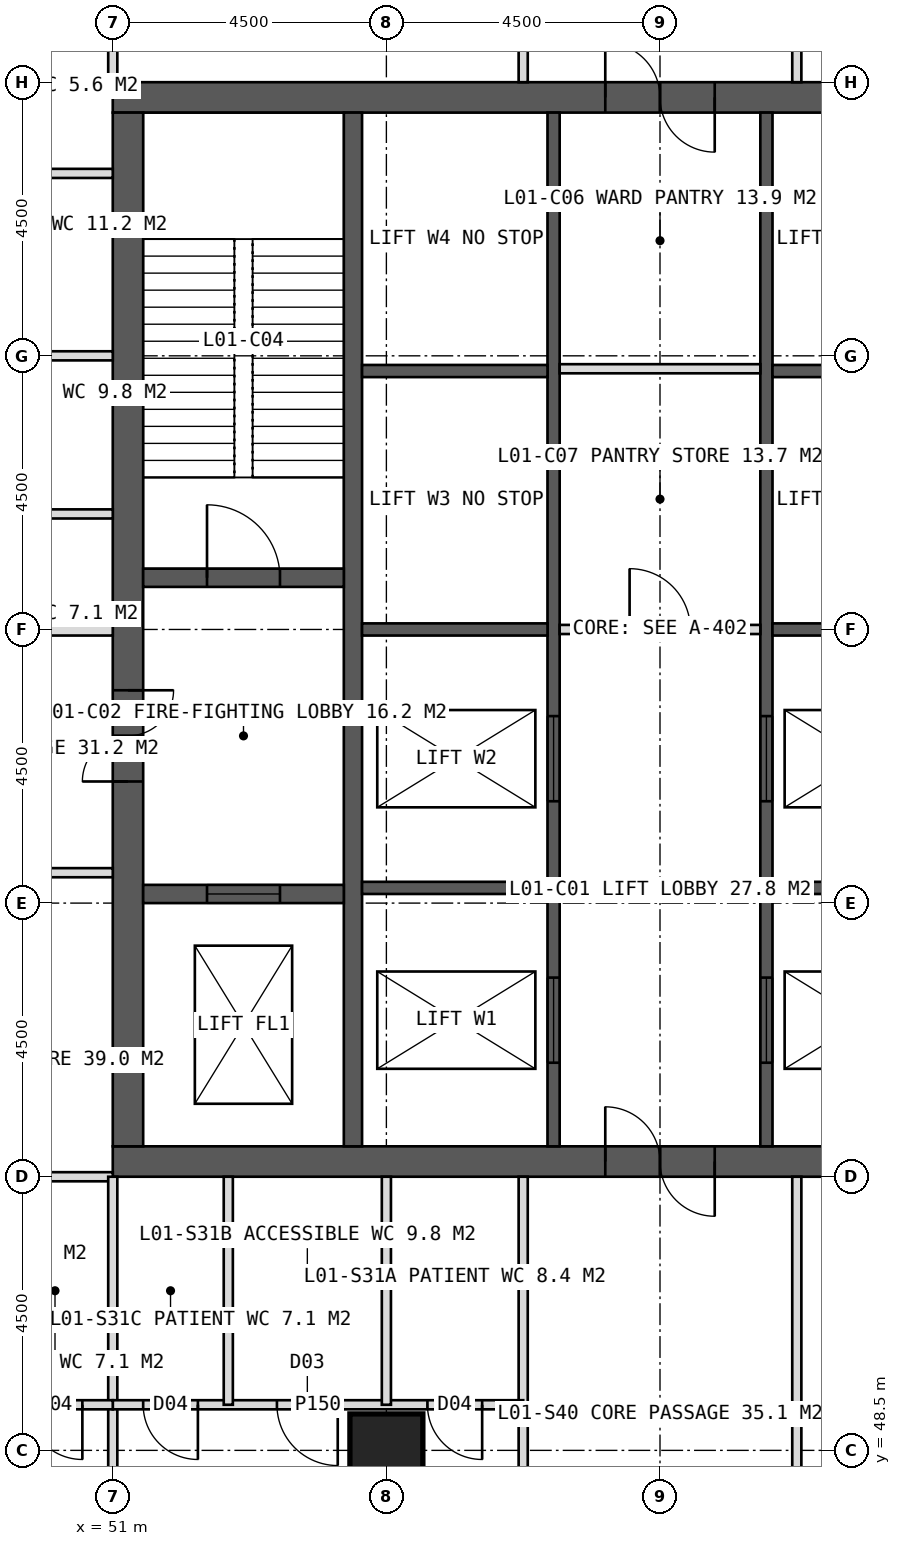
"""IFC4 building model, lengths in metres.
Left out: names, types, materials, properties, quantities, classifications, styles, units other than length and angle.
Written with IfcOpenShell. Run it as: python <this file> out.ifc"""

import sys

from ifc_helpers import new_model, si_unit, direction, frame, frame_2d, origin, origin_2d, place, context, subcontext, project, spatial, rectangle, hollow_rectangle, extrude, element, fill, save


model = new_model("IFC4")
c1 = context("Model", 3, precision=1e-05, world=origin(), true_north=direction((0.0, 1.0)))
c2 = subcontext(c1, "Body", "Model", "MODEL_VIEW")
j1 = project(units=[si_unit("LENGTHUNIT", "METRE"), si_unit("PLANEANGLEUNIT", "RADIAN")], contexts=[c1])
p1 = place(None, origin())
s1 = spatial("IfcSite", under=j1, at=p1, CompositionType="ELEMENT")
p2 = place(p1, origin())
s2 = spatial("IfcBuilding", under=s1, at=p2, CompositionType="ELEMENT")
p3 = place(p2, frame((0.0, 0.0, 6.0)))
s3 = spatial("IfcBuildingStorey", under=s2, at=p3, CompositionType="ELEMENT", Elevation=6.0)
p4 = place(p3, frame((51.0, 70.75, 0.0), z_axis=(0.0, 0.0, 1.0), x_axis=(1.0, 0.0, 0.0)))
e1 = element("IfcWall", 1, at=p4, inside=s3, PredefinedType="SHEAR", context=c2, shape_type="SweptSolid", body=[
    extrude(rectangle(XDim=18.0, YDim=0.5, at=frame_2d((9.0, 0.0))), origin(), (0.0, 0.0, 1.0), 5.0),
])
p5 = place(p4, frame((8.1, 0.0, 0.0)))
e2 = element("IfcOpeningElement", 2, at=p5, cuts=e1, PredefinedType="OPENING", context=c2, shape_type="SweptSolid", body=[
    extrude(rectangle(XDim=1.8, YDim=2.2, at=frame_2d((0.9, 1.1))), frame((0.0, 0.26, 0.0), z_axis=(0.0, -1.0, 0.0), x_axis=(1.0, 0.0, 0.0)), (0.0, 0.0, 1.0), 0.52),
])
p6 = place(p3, frame((51.0, 53.25, 0.0), z_axis=(0.0, 0.0, 1.0), x_axis=(1.0, 0.0, 0.0)))
e3 = element("IfcWall", 3, at=p6, inside=s3, PredefinedType="SHEAR", context=c2, shape_type="SweptSolid", body=[
    extrude(rectangle(XDim=18.0, YDim=0.5, at=frame_2d((9.0, 0.0))), origin(), (0.0, 0.0, 1.0), 5.0),
])
p7 = place(p6, frame((8.1, 0.0, 0.0)))
e4 = element("IfcOpeningElement", 4, at=p7, cuts=e3, PredefinedType="OPENING", context=c2, shape_type="SweptSolid", body=[
    extrude(rectangle(XDim=1.8, YDim=2.2, at=frame_2d((0.9, 1.1))), frame((0.0, 0.26, 0.0), z_axis=(0.0, -1.0, 0.0), x_axis=(1.0, 0.0, 0.0)), (0.0, 0.0, 1.0), 0.52),
])
p8 = place(p3, frame((51.25, 53.5, 0.0), z_axis=(0.0, 0.0, 1.0), x_axis=(0.0, 1.0, 0.0)))
e5 = element("IfcWall", 5, at=p8, inside=s3, PredefinedType="SHEAR", context=c2, shape_type="SweptSolid", body=[
    extrude(rectangle(XDim=17.0, YDim=0.5, at=frame_2d((8.5, 0.0))), origin(), (0.0, 0.0, 1.0), 5.0),
])
p9 = place(p8, frame((6.0, 0.0, 0.0)))
e6 = element("IfcOpeningElement", 6, at=p9, cuts=e5, PredefinedType="OPENING", context=c2, shape_type="SweptSolid", body=[
    extrude(rectangle(XDim=1.5, YDim=2.2, at=frame_2d((0.75, 1.1))), frame((0.0, 0.26, 0.0), z_axis=(0.0, -1.0, 0.0), x_axis=(1.0, 0.0, 0.0)), (0.0, 0.0, 1.0), 0.52),
])
p10 = place(p3, frame((54.95, 53.5, 0.0), z_axis=(0.0, 0.0, 1.0), x_axis=(0.0, 1.0, 0.0)))
e7 = element("IfcWall", 7, at=p10, inside=s3, PredefinedType="SHEAR", context=c2, shape_type="SweptSolid", body=[
    extrude(rectangle(XDim=17.0, YDim=0.3, at=frame_2d((8.5, 0.0))), origin(), (0.0, 0.0, 1.0), 5.0),
])
p11 = place(p3, frame((58.25, 53.5, 0.0), z_axis=(0.0, 0.0, 1.0), x_axis=(0.0, 1.0, 0.0)))
e8 = element("IfcWall", 8, at=p11, inside=s3, PredefinedType="SHEAR", context=c2, shape_type="SweptSolid", body=[
    extrude(rectangle(XDim=17.0, YDim=0.2, at=frame_2d((8.5, 0.0))), origin(), (0.0, 0.0, 1.0), 5.0),
])
p12 = place(p11, frame((1.375, 0.0, 0.0)))
e9 = element("IfcOpeningElement", 9, at=p12, cuts=e8, PredefinedType="OPENING", context=c2, shape_type="SweptSolid", body=[
    extrude(rectangle(XDim=1.4, YDim=2.2, at=frame_2d((0.7, 1.1))), frame((0.0, 0.11, 0.0), z_axis=(0.0, -1.0, 0.0), x_axis=(1.0, 0.0, 0.0)), (0.0, 0.0, 1.0), 0.22),
])
p13 = place(p11, frame((5.675, 0.0, 0.0)))
e10 = element("IfcOpeningElement", 10, at=p13, cuts=e8, PredefinedType="OPENING", context=c2, shape_type="SweptSolid", body=[
    extrude(rectangle(XDim=1.4, YDim=2.2, at=frame_2d((0.7, 1.1))), frame((0.0, 0.11, 0.0), z_axis=(0.0, -1.0, 0.0), x_axis=(1.0, 0.0, 0.0)), (0.0, 0.0, 1.0), 0.22),
])
p14 = place(p3, frame((61.75, 53.5, 0.0), z_axis=(0.0, 0.0, 1.0), x_axis=(0.0, 1.0, 0.0)))
e11 = element("IfcWall", 11, at=p14, inside=s3, PredefinedType="SHEAR", context=c2, shape_type="SweptSolid", body=[
    extrude(rectangle(XDim=17.0, YDim=0.2, at=frame_2d((8.5, 0.0))), origin(), (0.0, 0.0, 1.0), 5.0),
])
p15 = place(p14, frame((1.375, 0.0, 0.0)))
e12 = element("IfcOpeningElement", 12, at=p15, cuts=e11, PredefinedType="OPENING", context=c2, shape_type="SweptSolid", body=[
    extrude(rectangle(XDim=1.4, YDim=2.2, at=frame_2d((0.7, 1.1))), frame((0.0, 0.11, 0.0), z_axis=(0.0, -1.0, 0.0), x_axis=(1.0, 0.0, 0.0)), (0.0, 0.0, 1.0), 0.22),
])
p16 = place(p14, frame((5.675, 0.0, 0.0)))
e13 = element("IfcOpeningElement", 13, at=p16, cuts=e11, PredefinedType="OPENING", context=c2, shape_type="SweptSolid", body=[
    extrude(rectangle(XDim=1.4, YDim=2.2, at=frame_2d((0.7, 1.1))), frame((0.0, 0.11, 0.0), z_axis=(0.0, -1.0, 0.0), x_axis=(1.0, 0.0, 0.0)), (0.0, 0.0, 1.0), 0.22),
])
for number, where, z_axis, x_axis in (
    (14, (55.1, 57.75, 0.0), (0.0, 0.0, 1.0), (1.0, 0.0, 0.0)),
    (15, (61.85, 57.75, 0.0), (0.0, 0.0, 1.0), (1.0, 0.0, 0.0)),
    (16, (55.1, 62.0, 0.0), (0.0, 0.0, 1.0), (1.0, 0.0, 0.0)),
    (17, (61.85, 62.0, 0.0), (0.0, 0.0, 1.0), (1.0, 0.0, 0.0)),
    (18, (55.1, 66.25, 0.0), (0.0, 0.0, 1.0), (1.0, 0.0, 0.0)),
    (19, (61.85, 66.25, 0.0), (0.0, 0.0, 1.0), (1.0, 0.0, 0.0)),
):
    element("IfcWall", number, at=place(p3, frame(where, z_axis=z_axis, x_axis=x_axis)), inside=s3, PredefinedType="SHEAR", context=c2, shape_type="SweptSolid", body=[
        extrude(rectangle(XDim=3.05, YDim=0.2, at=frame_2d((1.525, 0.0))), origin(), (0.0, 0.0, 1.0), 5.0),
    ])
p17 = place(p3, frame((51.5, 62.85, 0.0), z_axis=(0.0, 0.0, 1.0), x_axis=(1.0, 0.0, 0.0)))
e20 = element("IfcWall", 20, at=p17, inside=s3, PredefinedType="SHEAR", context=c2, shape_type="SweptSolid", body=[
    extrude(rectangle(XDim=3.3, YDim=0.3, at=frame_2d((1.65, 0.0))), origin(), (0.0, 0.0, 1.0), 5.0),
])
p18 = place(p17, frame((1.05, 0.0, 0.0)))
e21 = element("IfcOpeningElement", 21, at=p18, cuts=e20, PredefinedType="OPENING", context=c2, shape_type="SweptSolid", body=[
    extrude(rectangle(XDim=1.2, YDim=2.1, at=frame_2d((0.6, 1.05))), frame((0.0, 0.16, 0.0), z_axis=(0.0, -1.0, 0.0), x_axis=(1.0, 0.0, 0.0)), (0.0, 0.0, 1.0), 0.32),
])
p19 = place(p3, frame((51.5, 57.65, 0.0), z_axis=(0.0, 0.0, 1.0), x_axis=(1.0, 0.0, 0.0)))
e22 = element("IfcWall", 22, at=p19, inside=s3, PredefinedType="SHEAR", context=c2, shape_type="SweptSolid", body=[
    extrude(rectangle(XDim=3.3, YDim=0.3, at=frame_2d((1.65, 0.0))), origin(), (0.0, 0.0, 1.0), 5.0),
])
p20 = place(p19, frame((1.05, 0.0, 0.0)))
e23 = element("IfcOpeningElement", 23, at=p20, cuts=e22, PredefinedType="OPENING", context=c2, shape_type="SweptSolid", body=[
    extrude(rectangle(XDim=1.2, YDim=2.2, at=frame_2d((0.6, 1.1))), frame((0.0, 0.16, 0.0), z_axis=(0.0, -1.0, 0.0), x_axis=(1.0, 0.0, 0.0)), (0.0, 0.0, 1.0), 0.32),
])
p21 = place(p3, frame((55.5, 48.5, 0.0), z_axis=(0.0, 0.0, 1.0), x_axis=(1.0, 0.0, 0.0)))
e24 = element("IfcColumn", 24, at=p21, inside=s3, PredefinedType="COLUMN", context=c2, shape_type="SweptSolid", body=[
    extrude(hollow_rectangle(XDim=1.2, YDim=1.2, WallThickness=0.1, at=origin_2d()), origin(), (0.0, 0.0, 1.0), 5.0),
])
for number, where, z_axis, x_axis in (
    (25, (51.0, 71.0, 0.0), (0.0, 0.0, 1.0), (0.0, 1.0, 0.0)),
    (26, (57.75, 71.0, 0.0), (0.0, 0.0, 1.0), (0.0, 1.0, 0.0)),
    (27, (62.25, 71.0, 0.0), (0.0, 0.0, 1.0), (0.0, 1.0, 0.0)),
    (28, (51.0, 53.0, 0.0), (0.0, 0.0, 1.0), (-1.0, 0.0, 0.0)),
):
    element("IfcWall", number, at=place(p3, frame(where, z_axis=z_axis, x_axis=x_axis)), inside=s3, PredefinedType="PARTITIONING", context=c2, shape_type="SweptSolid", body=[
        extrude(rectangle(XDim=7.8, YDim=0.15, at=frame_2d((3.9, 0.0))), origin(), (0.0, 0.0, 1.0), 4.7),
    ])
p22 = place(p3, frame((51.0, 58.0, 0.0), z_axis=(0.0, 0.0, 1.0), x_axis=(-1.0, 0.0, 0.0)))
e29 = element("IfcWall", 29, at=p22, inside=s3, PredefinedType="PARTITIONING", context=c2, shape_type="SweptSolid", body=[
    extrude(rectangle(XDim=3.9, YDim=0.15, at=frame_2d((1.95, 0.0))), origin(), (0.0, 0.0, 1.0), 4.7),
])
p23 = place(p3, frame((51.0, 62.0, 0.0), z_axis=(0.0, 0.0, 1.0), x_axis=(-1.0, 0.0, 0.0)))
e30 = element("IfcWall", 30, at=p23, inside=s3, PredefinedType="SOLIDWALL", context=c2, shape_type="SweptSolid", body=[
    extrude(rectangle(XDim=7.8, YDim=0.2, at=frame_2d((3.9, 0.0))), origin(), (0.0, 0.0, 1.0), 3.9),
])
p24 = place(p3, frame((51.0, 71.0, 0.0), z_axis=(0.0, 0.0, 1.0), x_axis=(-1.0, 0.0, 0.0)))
e31 = element("IfcWall", 31, at=p24, inside=s3, PredefinedType="PARTITIONING", context=c2, shape_type="SweptSolid", body=[
    extrude(rectangle(XDim=7.8, YDim=0.15, at=frame_2d((3.9, 0.0))), origin(), (0.0, 0.0, 1.0), 4.7),
])
p25 = place(p3, frame((51.0, 63.9, 0.0), z_axis=(0.0, 0.0, 1.0), x_axis=(-1.0, 0.0, 0.0)))
e32 = element("IfcWall", 32, at=p25, inside=s3, PredefinedType="PARTITIONING", context=c2, shape_type="SweptSolid", body=[
    extrude(rectangle(XDim=3.75, YDim=0.15, at=frame_2d((1.875, 0.0))), origin(), (0.0, 0.0, 1.0), 4.7),
])
p26 = place(p3, frame((51.0, 66.5, 0.0), z_axis=(0.0, 0.0, 1.0), x_axis=(-1.0, 0.0, 0.0)))
e33 = element("IfcWall", 33, at=p26, inside=s3, PredefinedType="PARTITIONING", context=c2, shape_type="SweptSolid", body=[
    extrude(rectangle(XDim=3.75, YDim=0.15, at=frame_2d((1.875, 0.0))), origin(), (0.0, 0.0, 1.0), 3.8),
])
p27 = place(p3, frame((51.0, 69.5, 0.0), z_axis=(0.0, 0.0, 1.0), x_axis=(-1.0, 0.0, 0.0)))
e34 = element("IfcWall", 34, at=p27, inside=s3, PredefinedType="PARTITIONING", context=c2, shape_type="SweptSolid", body=[
    extrude(rectangle(XDim=3.75, YDim=0.15, at=frame_2d((1.875, 0.0))), origin(), (0.0, 0.0, 1.0), 4.7),
])
for number, where, z_axis, x_axis in (
    (35, (62.25, 53.0, 0.0), (0.0, 0.0, 1.0), (0.0, -1.0, 0.0)),
    (36, (57.75, 53.0, 0.0), (0.0, 0.0, 1.0), (0.0, -1.0, 0.0)),
    (37, (51.0, 53.0, 0.0), (0.0, 0.0, 1.0), (0.0, -1.0, 0.0)),
):
    element("IfcWall", number, at=place(p3, frame(where, z_axis=z_axis, x_axis=x_axis)), inside=s3, PredefinedType="PARTITIONING", context=c2, shape_type="SweptSolid", body=[
        extrude(rectangle(XDim=7.8, YDim=0.15, at=frame_2d((3.9, 0.0))), origin(), (0.0, 0.0, 1.0), 4.7),
    ])
p28 = place(p3, frame((57.75, 49.25, 0.0), z_axis=(0.0, 0.0, 1.0), x_axis=(-1.0, 0.0, 0.0)))
e38 = element("IfcWall", 38, at=p28, inside=s3, PredefinedType="PARTITIONING", context=c2, shape_type="SweptSolid", body=[
    extrude(rectangle(XDim=6.75, YDim=0.15, at=frame_2d((3.375, 0.0))), origin(), (0.0, 0.0, 1.0), 4.7),
])
p29 = place(p28, frame((0.675, 0.0, 0.0)))
e39 = element("IfcOpeningElement", 39, at=p29, cuts=e38, PredefinedType="OPENING", context=c2, shape_type="SweptSolid", body=[
    extrude(rectangle(XDim=0.9, YDim=2.1, at=frame_2d((0.45, 1.05))), frame((0.0, 0.085, 0.0), z_axis=(0.0, -1.0, 0.0), x_axis=(1.0, 0.0, 0.0)), (0.0, 0.0, 1.0), 0.17),
])
p30 = place(p28, frame((3.05, 0.0, 0.0)))
e40 = element("IfcOpeningElement", 40, at=p30, cuts=e38, PredefinedType="OPENING", context=c2, shape_type="SweptSolid", body=[
    extrude(rectangle(XDim=1.0, YDim=2.1, at=frame_2d((0.5, 1.05))), frame((0.0, 0.085, 0.0), z_axis=(0.0, -1.0, 0.0), x_axis=(1.0, 0.0, 0.0)), (0.0, 0.0, 1.0), 0.17),
])
p31 = place(p28, frame((5.35, 0.0, 0.0)))
e41 = element("IfcOpeningElement", 41, at=p31, cuts=e38, PredefinedType="OPENING", context=c2, shape_type="SweptSolid", body=[
    extrude(rectangle(XDim=0.9, YDim=2.1, at=frame_2d((0.45, 1.05))), frame((0.0, 0.085, 0.0), z_axis=(0.0, -1.0, 0.0), x_axis=(1.0, 0.0, 0.0)), (0.0, 0.0, 1.0), 0.17),
])
p32 = place(p3, frame((55.5, 53.0, 0.0), z_axis=(0.0, 0.0, 1.0), x_axis=(0.0, -1.0, 0.0)))
e42 = element("IfcWall", 42, at=p32, inside=s3, PredefinedType="PARTITIONING", context=c2, shape_type="SweptSolid", body=[
    extrude(rectangle(XDim=3.75, YDim=0.15, at=frame_2d((1.875, 0.0))), origin(), (0.0, 0.0, 1.0), 3.8),
])
p33 = place(p3, frame((52.9, 53.0, 0.0), z_axis=(0.0, 0.0, 1.0), x_axis=(0.0, -1.0, 0.0)))
e43 = element("IfcWall", 43, at=p33, inside=s3, PredefinedType="PARTITIONING", context=c2, shape_type="SweptSolid", body=[
    extrude(rectangle(XDim=3.75, YDim=0.15, at=frame_2d((1.875, 0.0))), origin(), (0.0, 0.0, 1.0), 4.7),
])
p34 = place(p3, frame((51.0, 49.25, 0.0), z_axis=(0.0, 0.0, 1.0), x_axis=(-1.0, 0.0, 0.0)))
e44 = element("IfcWall", 44, at=p34, inside=s3, PredefinedType="PARTITIONING", context=c2, shape_type="SweptSolid", body=[
    extrude(rectangle(XDim=7.8, YDim=0.15, at=frame_2d((3.9, 0.0))), origin(), (0.0, 0.0, 1.0), 4.7),
])
p35 = place(p34, frame((0.5, 0.0, 0.0)))
e45 = element("IfcOpeningElement", 45, at=p35, cuts=e44, PredefinedType="OPENING", context=c2, shape_type="SweptSolid", body=[
    extrude(rectangle(XDim=0.9, YDim=2.1, at=frame_2d((0.45, 1.05))), frame((0.0, 0.085, 0.0), z_axis=(0.0, -1.0, 0.0), x_axis=(1.0, 0.0, 0.0)), (0.0, 0.0, 1.0), 0.17),
])
p36 = place(p34, frame((2.7, 0.0, 0.0)))
e46 = element("IfcOpeningElement", 46, at=p36, cuts=e44, PredefinedType="OPENING", context=c2, shape_type="SweptSolid", body=[
    extrude(rectangle(XDim=1.0, YDim=2.1, at=frame_2d((0.5, 1.05))), frame((0.0, 0.085, 0.0), z_axis=(0.0, -1.0, 0.0), x_axis=(1.0, 0.0, 0.0)), (0.0, 0.0, 1.0), 0.17),
])
p37 = place(p34, frame((5.7, 0.0, 0.0)))
e47 = element("IfcOpeningElement", 47, at=p37, cuts=e44, PredefinedType="OPENING", context=c2, shape_type="SweptSolid", body=[
    extrude(rectangle(XDim=0.9, YDim=2.1, at=frame_2d((0.45, 1.05))), frame((0.0, 0.085, 0.0), z_axis=(0.0, -1.0, 0.0), x_axis=(1.0, 0.0, 0.0)), (0.0, 0.0, 1.0), 0.17),
])
p38 = place(p3, frame((58.35, 62.0, 0.0), z_axis=(0.0, 0.0, 1.0), x_axis=(1.0, 0.0, 0.0)))
e48 = element("IfcWall", 48, at=p38, inside=s3, PredefinedType="PARTITIONING", context=c2, shape_type="SweptSolid", body=[
    extrude(rectangle(XDim=3.3, YDim=0.15, at=frame_2d((1.65, 0.0))), origin(), (0.0, 0.0, 1.0), 4.7),
])
p39 = place(p38, frame((1.15, 0.0, 0.0)))
e49 = element("IfcOpeningElement", 49, at=p39, cuts=e48, PredefinedType="OPENING", context=c2, shape_type="SweptSolid", body=[
    extrude(rectangle(XDim=1.0, YDim=2.1, at=frame_2d((0.5, 1.05))), frame((0.0, 0.085, 0.0), z_axis=(0.0, -1.0, 0.0), x_axis=(1.0, 0.0, 0.0)), (0.0, 0.0, 1.0), 0.17),
])
p40 = place(p3, frame((58.35, 66.288, 0.0), z_axis=(0.0, 0.0, 1.0), x_axis=(1.0, 0.0, 0.0)))
e50 = element("IfcWall", 50, at=p40, inside=s3, PredefinedType="PARTITIONING", context=c2, shape_type="SweptSolid", body=[
    extrude(rectangle(XDim=3.3, YDim=0.15, at=frame_2d((1.65, 0.0))), origin(), (0.0, 0.0, 1.0), 4.7),
])
p41 = place(p7, origin())
e51 = element("IfcDoor", 51, at=p41, inside=s3, OperationType="DOUBLE_DOOR_SINGLE_SWING", PredefinedType="DOOR", context=c2, shape_type="SweptSolid", body=[
    extrude(rectangle(XDim=1.8, YDim=2.2, at=frame_2d((0.9, 1.1))), frame((0.0, 0.025, 0.0), z_axis=(0.0, -1.0, 0.0), x_axis=(1.0, 0.0, 0.0)), (0.0, 0.0, 1.0), 0.05),
])
fill(e4, e51)
p42 = place(p9, origin())
e52 = element("IfcDoor", 52, at=p42, inside=s3, OperationType="DOUBLE_DOOR_SINGLE_SWING", PredefinedType="DOOR", context=c2, shape_type="SweptSolid", body=[
    extrude(rectangle(XDim=1.5, YDim=2.2, at=frame_2d((0.75, 1.1))), frame((0.0, 0.025, 0.0), z_axis=(0.0, -1.0, 0.0), x_axis=(1.0, 0.0, 0.0)), (0.0, 0.0, 1.0), 0.05),
])
fill(e6, e52)
p43 = place(p18, origin())
e53 = element("IfcDoor", 53, at=p43, inside=s3, OperationType="SINGLE_SWING_LEFT", PredefinedType="DOOR", context=c2, shape_type="SweptSolid", body=[
    extrude(rectangle(XDim=1.2, YDim=2.1, at=frame_2d((0.6, 1.05))), frame((0.0, 0.025, 0.0), z_axis=(0.0, -1.0, 0.0), x_axis=(1.0, 0.0, 0.0)), (0.0, 0.0, 1.0), 0.05),
])
fill(e21, e53)
p44 = place(p20, origin())
e54 = element("IfcDoor", 54, at=p44, inside=s3, OperationType="SLIDING_TO_LEFT", PredefinedType="DOOR", context=c2, shape_type="SweptSolid", body=[
    extrude(rectangle(XDim=1.2, YDim=2.2, at=frame_2d((0.6, 1.1))), frame((0.0, 0.025, 0.0), z_axis=(0.0, -1.0, 0.0), x_axis=(1.0, 0.0, 0.0)), (0.0, 0.0, 1.0), 0.05),
])
fill(e23, e54)
p45 = place(p12, origin())
e55 = element("IfcDoor", 55, at=p45, inside=s3, OperationType="SLIDING_TO_LEFT", PredefinedType="DOOR", context=c2, shape_type="SweptSolid", body=[
    extrude(rectangle(XDim=1.4, YDim=2.2, at=frame_2d((0.7, 1.1))), frame((0.0, 0.025, 0.0), z_axis=(0.0, -1.0, 0.0), x_axis=(1.0, 0.0, 0.0)), (0.0, 0.0, 1.0), 0.05),
])
fill(e9, e55)
p46 = place(p15, origin())
e56 = element("IfcDoor", 56, at=p46, inside=s3, OperationType="SLIDING_TO_LEFT", PredefinedType="DOOR", context=c2, shape_type="SweptSolid", body=[
    extrude(rectangle(XDim=1.4, YDim=2.2, at=frame_2d((0.7, 1.1))), frame((0.0, 0.025, 0.0), z_axis=(0.0, -1.0, 0.0), x_axis=(1.0, 0.0, 0.0)), (0.0, 0.0, 1.0), 0.05),
])
fill(e12, e56)
p47 = place(p13, origin())
e57 = element("IfcDoor", 57, at=p47, inside=s3, OperationType="SLIDING_TO_LEFT", PredefinedType="DOOR", context=c2, shape_type="SweptSolid", body=[
    extrude(rectangle(XDim=1.4, YDim=2.2, at=frame_2d((0.7, 1.1))), frame((0.0, 0.025, 0.0), z_axis=(0.0, -1.0, 0.0), x_axis=(1.0, 0.0, 0.0)), (0.0, 0.0, 1.0), 0.05),
])
fill(e10, e57)
p48 = place(p16, origin())
e58 = element("IfcDoor", 58, at=p48, inside=s3, OperationType="SLIDING_TO_LEFT", PredefinedType="DOOR", context=c2, shape_type="SweptSolid", body=[
    extrude(rectangle(XDim=1.4, YDim=2.2, at=frame_2d((0.7, 1.1))), frame((0.0, 0.025, 0.0), z_axis=(0.0, -1.0, 0.0), x_axis=(1.0, 0.0, 0.0)), (0.0, 0.0, 1.0), 0.05),
])
fill(e13, e58)
p49 = place(p39, origin())
e59 = element("IfcDoor", 59, at=p49, inside=s3, OperationType="SINGLE_SWING_LEFT", PredefinedType="DOOR", context=c2, shape_type="SweptSolid", body=[
    extrude(rectangle(XDim=1.0, YDim=2.1, at=frame_2d((0.5, 1.05))), frame((0.0, 0.025, 0.0), z_axis=(0.0, -1.0, 0.0), x_axis=(1.0, 0.0, 0.0)), (0.0, 0.0, 1.0), 0.05),
])
fill(e49, e59)
p50 = place(p5, origin())
e60 = element("IfcDoor", 60, at=p50, inside=s3, OperationType="DOUBLE_DOOR_SINGLE_SWING", PredefinedType="DOOR", context=c2, shape_type="SweptSolid", body=[
    extrude(rectangle(XDim=1.8, YDim=2.2, at=frame_2d((0.9, 1.1))), frame((0.0, 0.025, 0.0), z_axis=(0.0, -1.0, 0.0), x_axis=(1.0, 0.0, 0.0)), (0.0, 0.0, 1.0), 0.05),
])
fill(e2, e60)
p51 = place(p29, origin())
e61 = element("IfcDoor", 61, at=p51, inside=s3, OperationType="SINGLE_SWING_LEFT", PredefinedType="DOOR", context=c2, shape_type="SweptSolid", body=[
    extrude(rectangle(XDim=0.9, YDim=2.1, at=frame_2d((0.45, 1.05))), frame((0.0, 0.025, 0.0), z_axis=(0.0, -1.0, 0.0), x_axis=(1.0, 0.0, 0.0)), (0.0, 0.0, 1.0), 0.05),
])
fill(e39, e61)
p52 = place(p30, origin())
e62 = element("IfcDoor", 62, at=p52, inside=s3, OperationType="SINGLE_SWING_LEFT", PredefinedType="DOOR", context=c2, shape_type="SweptSolid", body=[
    extrude(rectangle(XDim=1.0, YDim=2.1, at=frame_2d((0.5, 1.05))), frame((0.0, 0.025, 0.0), z_axis=(0.0, -1.0, 0.0), x_axis=(1.0, 0.0, 0.0)), (0.0, 0.0, 1.0), 0.05),
])
fill(e40, e62)
p53 = place(p31, origin())
e63 = element("IfcDoor", 63, at=p53, inside=s3, OperationType="SINGLE_SWING_LEFT", PredefinedType="DOOR", context=c2, shape_type="SweptSolid", body=[
    extrude(rectangle(XDim=0.9, YDim=2.1, at=frame_2d((0.45, 1.05))), frame((0.0, 0.025, 0.0), z_axis=(0.0, -1.0, 0.0), x_axis=(1.0, 0.0, 0.0)), (0.0, 0.0, 1.0), 0.05),
])
fill(e41, e63)
p54 = place(p35, origin())
e64 = element("IfcDoor", 64, at=p54, inside=s3, OperationType="SINGLE_SWING_LEFT", PredefinedType="DOOR", context=c2, shape_type="SweptSolid", body=[
    extrude(rectangle(XDim=0.9, YDim=2.1, at=frame_2d((0.45, 1.05))), frame((0.0, 0.025, 0.0), z_axis=(0.0, -1.0, 0.0), x_axis=(1.0, 0.0, 0.0)), (0.0, 0.0, 1.0), 0.05),
])
fill(e45, e64)
save(model, sys.argv[1])
